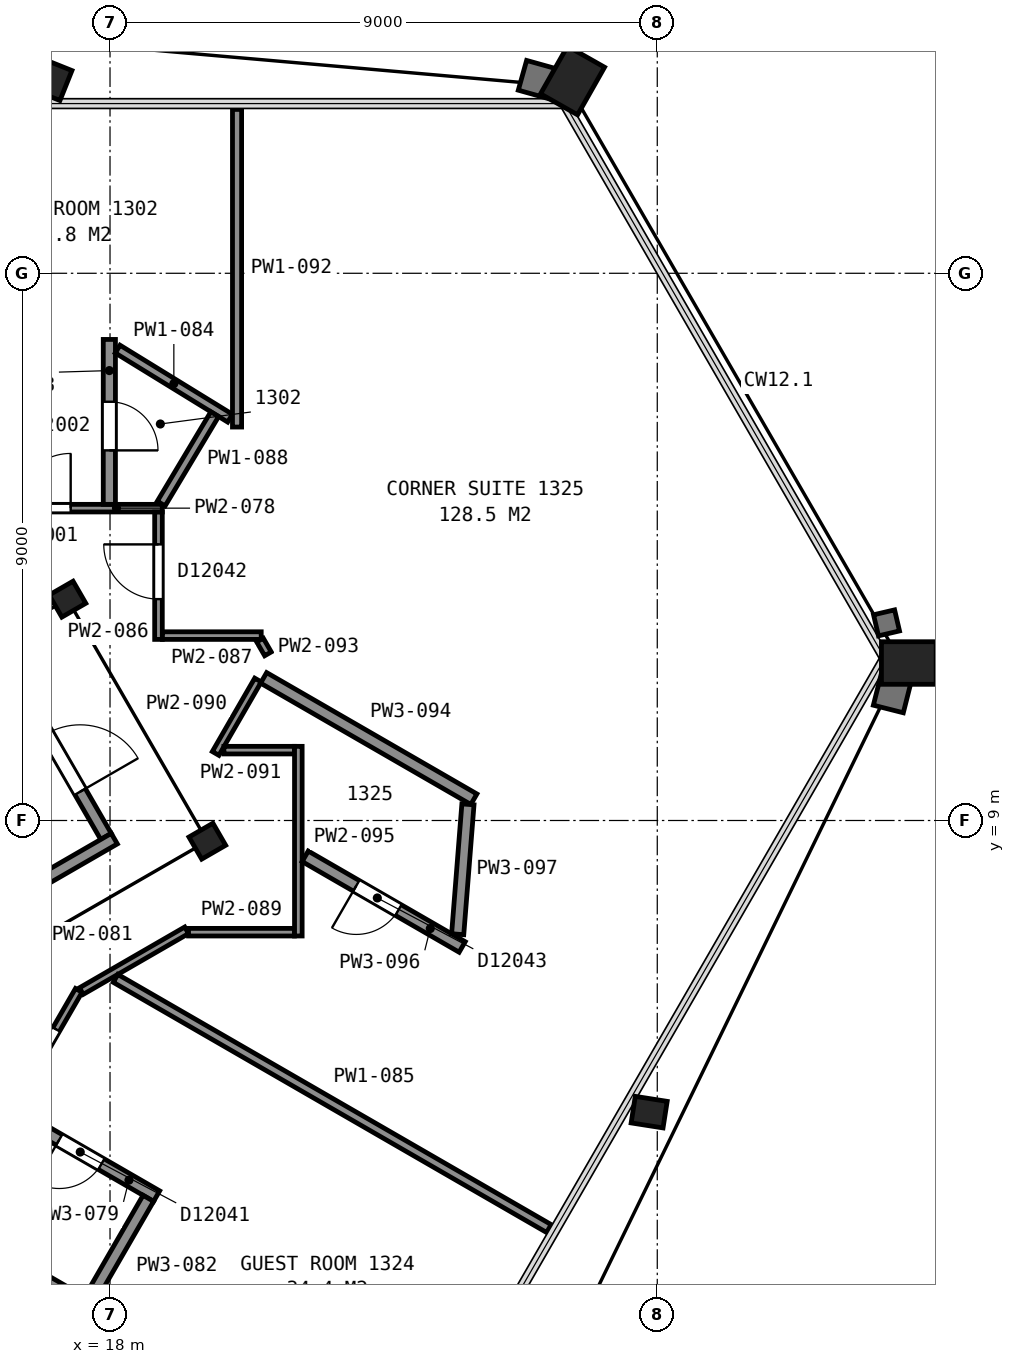
"""IFC4 building model, lengths in metres.
Left out: names, types, materials, properties, quantities, classifications, styles, units other than length and angle.
Written with IfcOpenShell. Run it as: python <this file> out.ifc"""

import sys

from ifc_helpers import new_model, si_unit, direction, frame, frame_2d, origin, origin_2d, place, context, subcontext, project, spatial, rectangle, hollow_rectangle, i_section, extrude, element, fill, save


model = new_model("IFC4")
c1 = context("Model", 3, precision=1e-05, world=origin(), true_north=direction((0.0, 1.0)))
c2 = subcontext(c1, "Body", "Model", "MODEL_VIEW")
j1 = project(units=[si_unit("LENGTHUNIT", "METRE"), si_unit("PLANEANGLEUNIT", "RADIAN")], contexts=[c1])
p1 = place(None, origin())
s1 = spatial("IfcSite", under=j1, at=p1, CompositionType="ELEMENT")
p2 = place(p1, origin())
s2 = spatial("IfcBuilding", under=s1, at=p2, CompositionType="ELEMENT")
p3 = place(p2, frame((0.0, 0.0, 62.0)))
s3 = spatial("IfcBuildingStorey", under=s2, at=p3, CompositionType="ELEMENT", Elevation=62.0)
p4 = place(p3, frame((25.552, 21.073, 0.04), z_axis=(0.046948393509, 0.082988189703, 0.995444025908), x_axis=(0.500028643682, -0.864649637283, 0.048501136518)))
e1 = element("IfcColumn", 1, at=p4, inside=s3, PredefinedType="COLUMN", context=c2, shape_type="SweptSolid", body=[
    extrude(hollow_rectangle(XDim=0.7, YDim=0.9, WallThickness=0.065, at=origin_2d()), origin(), (0.0, 0.0, 1.0), 3.536),
])
p5 = place(p3, frame((17.031, 21.072, 0.025), z_axis=(0.033220358645, 0.083016648819, 0.995994299075), x_axis=(0.999444605974, -0.000142602776, -0.033323554043)))
e2 = element("IfcColumn", 2, at=p5, inside=s3, PredefinedType="COLUMN", context=c2, shape_type="SweptSolid", body=[
    extrude(i_section(OverallWidth=0.442, OverallDepth=0.531, WebThickness=0.066, FlangeThickness=0.106, FilletRadius=0.015, at=origin_2d()), origin(), (0.0, 0.0, 1.0), 3.564),
])
p6 = place(p3, frame((26.762, 4.22, 0.025), z_axis=(0.088563028631, -0.013835832779, 0.99597447743), x_axis=(-0.499716358069, -0.86558252114, 0.032410809553)))
e3 = element("IfcColumn", 3, at=p6, inside=s3, PredefinedType="COLUMN", context=c2, shape_type="SweptSolid", body=[
    extrude(i_section(OverallWidth=0.442, OverallDepth=0.531, WebThickness=0.066, FlangeThickness=0.106, FilletRadius=0.015, at=origin_2d()), origin(), (0.0, 0.0, 1.0), 3.564),
])
p7 = place(p3, frame((31.024, 11.59, 0.04), z_axis=(0.096783070485, 0.0, 0.995305499466), x_axis=(0.49940885804, -0.865004332753, -0.048562298444)))
e4 = element("IfcColumn", 4, at=p7, inside=s3, PredefinedType="COLUMN", context=c2, shape_type="SweptSolid", body=[
    extrude(hollow_rectangle(XDim=0.7, YDim=0.9, WallThickness=0.065, at=origin_2d()), origin(), (0.0, 0.0, 1.0), 3.537),
])
for number, where, z_axis, x_axis in (
    (5, (19.6, 8.66, 0.0), (0.0, 0.0, 1.0), (0.5, -0.866, 0.0)),
    (6, (17.3, 12.64, 0.0), (0.0, 0.0, 1.0), (0.5, -0.866, 0.0)),
):
    element("IfcColumn", number, at=place(p3, frame(where, z_axis=z_axis, x_axis=x_axis)), inside=s3, PredefinedType="COLUMN", context=c2, shape_type="SweptSolid", body=[
        extrude(i_section(OverallWidth=0.419, OverallDepth=0.455, WebThickness=0.042, FlangeThickness=0.068, FilletRadius=0.015, at=origin_2d()), origin(), (0.0, 0.0, 1.0), 3.6),
    ])
p8 = place(p3, frame((17.934, 8.738, 0.0), z_axis=(0.0, 0.0, 1.0), x_axis=(-0.49998411664, 0.866034573852, 0.0)))
e7 = element("IfcWall", 7, at=p8, inside=s3, PredefinedType="PARTITIONING", context=c2, shape_type="SweptSolid", body=[
    extrude(rectangle(XDim=2.8, YDim=0.2, at=frame_2d((1.4, 0.0))), origin(), (0.0, 0.0, 1.0), 3.35),
])
p9 = place(p8, frame((0.85, 0.0, 0.0)))
e8 = element("IfcOpeningElement", 8, at=p9, cuts=e7, PredefinedType="OPENING", context=c2, shape_type="SweptSolid", body=[
    extrude(rectangle(XDim=1.1, YDim=2.1, at=frame_2d((0.55, 1.05))), frame((0.0, 0.11, 0.0), z_axis=(0.0, -1.0, 0.0), x_axis=(1.0, 0.0, 0.0)), (0.0, 0.0, 1.0), 0.22),
])
p10 = place(p3, frame((7.678, 2.701, 0.0), z_axis=(0.0, 0.0, 1.0), x_axis=(0.866026010844, 0.49999894854, 0.0)))
e9 = element("IfcWall", 9, at=p10, inside=s3, PredefinedType="PARTITIONING", context=c2, shape_type="SweptSolid", body=[
    extrude(rectangle(XDim=12.0, YDim=0.2, at=frame_2d((6.0, 0.0))), origin(), (0.0, 0.0, 1.0), 3.35),
])
p11 = place(p3, frame((17.486, 6.206, 0.0), z_axis=(0.0, 0.0, 1.0), x_axis=(-0.499990458811, -0.866030912322, 0.0)))
e10 = element("IfcWall", 10, at=p11, inside=s3, PredefinedType="PARTITIONING", context=c2, shape_type="SweptSolid", body=[
    extrude(rectangle(XDim=27.441, YDim=0.125, at=frame_2d((13.721, 0.0))), origin(), (0.0, 0.0, 1.0), 2.613),
])
p12 = place(p11, frame((20.529, 0.0, 0.0)))
e11 = element("IfcOpeningElement", 11, at=p12, cuts=e10, PredefinedType="OPENING", context=c2, shape_type="SweptSolid", body=[
    extrude(rectangle(XDim=0.9, YDim=2.1, at=frame_2d((0.45, 1.05))), frame((0.0, 0.073, 0.0), z_axis=(0.0, -1.0, 0.0), x_axis=(1.0, 0.0, 0.0)), (0.0, 0.0, 1.0), 0.145),
])
p13 = place(p11, frame((17.516, 0.0, 0.0)))
e12 = element("IfcOpeningElement", 12, at=p13, cuts=e10, PredefinedType="OPENING", context=c2, shape_type="SweptSolid", body=[
    extrude(rectangle(XDim=0.9, YDim=2.1, at=frame_2d((0.45, 1.05))), frame((0.0, 0.073, 0.0), z_axis=(0.0, -1.0, 0.0), x_axis=(1.0, 0.0, 0.0)), (0.0, 0.0, 1.0), 0.145),
])
p14 = place(p11, frame((10.168, 0.0, 0.0)))
e13 = element("IfcOpeningElement", 13, at=p14, cuts=e10, PredefinedType="OPENING", context=c2, shape_type="SweptSolid", body=[
    extrude(rectangle(XDim=0.9, YDim=2.1, at=frame_2d((0.45, 1.05))), frame((0.0, 0.073, 0.0), z_axis=(0.0, -1.0, 0.0), x_axis=(1.0, 0.0, 0.0)), (0.0, 0.0, 1.0), 0.145),
])
p15 = place(p11, frame((7.403, 0.0, 0.0)))
e14 = element("IfcOpeningElement", 14, at=p15, cuts=e10, PredefinedType="OPENING", context=c2, shape_type="SweptSolid", body=[
    extrude(rectangle(XDim=0.9, YDim=2.1, at=frame_2d((0.45, 1.05))), frame((0.0, 0.073, 0.0), z_axis=(0.0, -1.0, 0.0), x_axis=(1.0, 0.0, 0.0)), (0.0, 0.0, 1.0), 0.145),
])
p16 = place(p11, frame((0.741, 0.0, 0.0)))
e15 = element("IfcOpeningElement", 15, at=p16, cuts=e10, PredefinedType="OPENING", context=c2, shape_type="SweptSolid", body=[
    extrude(rectangle(XDim=0.9, YDim=2.1, at=frame_2d((0.45, 1.05))), frame((0.0, 0.073, 0.0), z_axis=(0.0, -1.0, 0.0), x_axis=(1.0, 0.0, 0.0)), (0.0, 0.0, 1.0), 0.145),
])
p17 = place(p3, frame((15.349, 2.37, 0.0), z_axis=(0.0, 0.0, 1.0), x_axis=(0.866033609522, -0.499985786976, 0.0)))
e16 = element("IfcWall", 16, at=p17, inside=s3, PredefinedType="PARTITIONING", context=c2, shape_type="SweptSolid", body=[
    extrude(rectangle(XDim=8.587, YDim=0.15, at=frame_2d((4.293, 0.0))), origin(), (0.0, 0.0, 1.0), 2.613),
])
p18 = place(p3, frame((15.74, 14.137, 0.0), z_axis=(0.0, 0.0, 1.0), x_axis=(1.0, 0.0, 0.0)))
e17 = element("IfcWall", 17, at=p18, inside=s3, PredefinedType="PARTITIONING", context=c2, shape_type="SweptSolid", body=[
    extrude(rectangle(XDim=3.119, YDim=0.125, at=frame_2d((1.56, 0.0))), origin(), (0.0, 0.0, 1.0), 2.613),
])
p19 = place(p18, frame((0.712, 0.0, 0.0)))
e18 = element("IfcOpeningElement", 18, at=p19, cuts=e17, PredefinedType="OPENING", context=c2, shape_type="SweptSolid", body=[
    extrude(rectangle(XDim=0.9, YDim=2.1, at=frame_2d((0.45, 1.05))), frame((0.0, 0.073, 0.0), z_axis=(0.0, -1.0, 0.0), x_axis=(1.0, 0.0, 0.0)), (0.0, 0.0, 1.0), 0.145),
])
p20 = place(p3, frame((18.767, 2.822, 0.0), z_axis=(0.0, 0.0, 1.0), x_axis=(-0.866117296485, 0.499840803386, 0.0)))
e19 = element("IfcWall", 19, at=p20, inside=s3, PredefinedType="PARTITIONING", context=c2, shape_type="SweptSolid", body=[
    extrude(rectangle(XDim=2.738, YDim=0.2, at=frame_2d((1.369, 0.0))), origin(), (0.0, 0.0, 1.0), 2.613),
])
p21 = place(p20, frame((1.051, 0.0, 0.0)))
e20 = element("IfcOpeningElement", 20, at=p21, cuts=e19, PredefinedType="OPENING", context=c2, shape_type="SweptSolid", body=[
    extrude(rectangle(XDim=0.8, YDim=2.1, at=frame_2d((0.4, 1.05))), frame((0.0, 0.11, 0.0), z_axis=(0.0, -1.0, 0.0), x_axis=(1.0, 0.0, 0.0)), (0.0, 0.0, 1.0), 0.22),
])
p22 = place(p3, frame((17.529, 6.195, 0.0), z_axis=(0.0, 0.0, 1.0), x_axis=(0.866002566612, 0.500039553057, 0.0)))
e21 = element("IfcWall", 21, at=p22, inside=s3, PredefinedType="PARTITIONING", context=c2, shape_type="SweptSolid", body=[
    extrude(rectangle(XDim=1.999, YDim=0.125, at=frame_2d((1.0, 0.0))), origin(), (0.0, 0.0, 1.0), 2.613),
])
p23 = place(p3, frame((17.669, 1.123, 0.0), z_axis=(0.0, 0.0, 1.0), x_axis=(0.500269123289, 0.865869969617, 0.0)))
e22 = element("IfcWall", 22, at=p23, inside=s3, PredefinedType="PARTITIONING", context=c2, shape_type="SweptSolid", body=[
    extrude(rectangle(XDim=1.92, YDim=0.2, at=frame_2d((0.96, 0.0))), origin(), (0.0, 0.0, 1.0), 2.613),
])
p24 = place(p3, frame((17.989, 16.912, 0.0), z_axis=(0.0, 0.0, 1.0), x_axis=(0.0, -1.0, 0.0)))
e23 = element("IfcWall", 23, at=p24, inside=s3, PredefinedType="PARTITIONING", context=c2, shape_type="SweptSolid", body=[
    extrude(rectangle(XDim=2.713, YDim=0.2, at=frame_2d((1.356, 0.0))), origin(), (0.0, 0.0, 1.0), 2.613),
])
p25 = place(p24, frame((1.025, 0.0, 0.0)))
e24 = element("IfcOpeningElement", 24, at=p25, cuts=e23, PredefinedType="OPENING", context=c2, shape_type="SweptSolid", body=[
    extrude(rectangle(XDim=0.8, YDim=2.1, at=frame_2d((0.4, 1.05))), frame((0.0, 0.11, 0.0), z_axis=(0.0, -1.0, 0.0), x_axis=(1.0, 0.0, 0.0)), (0.0, 0.0, 1.0), 0.22),
])
p26 = place(p3, frame((18.125, 16.753, 0.0), z_axis=(0.0, 0.0, 1.0), x_axis=(0.851893865078, -0.523714466711, 0.0)))
e25 = element("IfcWall", 25, at=p26, inside=s3, PredefinedType="PARTITIONING", context=c2, shape_type="SweptSolid", body=[
    extrude(rectangle(XDim=2.17, YDim=0.15, at=frame_2d((1.085, 0.0))), origin(), (0.0, 0.0, 1.0), 2.613),
])
p27 = place(p3, frame((18.091, 6.403, 0.0), z_axis=(0.0, 0.0, 1.0), x_axis=(0.866038366034, -0.499977548053, 0.0)))
e26 = element("IfcWall", 26, at=p27, inside=s3, PredefinedType="PARTITIONING", context=c2, shape_type="SweptSolid", body=[
    extrude(rectangle(XDim=8.229, YDim=0.15, at=frame_2d((4.115, 0.0))), origin(), (0.0, 0.0, 1.0), 2.613),
])
p28 = place(p3, frame((18.797, 14.072, 0.0), z_axis=(0.0, 0.0, 1.0), x_axis=(0.0, -1.0, 0.0)))
e27 = element("IfcWall", 27, at=p28, inside=s3, PredefinedType="PARTITIONING", context=c2, shape_type="SweptSolid", body=[
    extrude(rectangle(XDim=2.094, YDim=0.125, at=frame_2d((1.047, 0.0))), origin(), (0.0, 0.0, 1.0), 2.613),
])
p29 = place(p28, frame((0.531, 0.0, 0.0)))
e28 = element("IfcOpeningElement", 28, at=p29, cuts=e27, PredefinedType="OPENING", context=c2, shape_type="SweptSolid", body=[
    extrude(rectangle(XDim=0.9, YDim=2.1, at=frame_2d((0.45, 1.05))), frame((0.0, 0.073, 0.0), z_axis=(0.0, -1.0, 0.0), x_axis=(1.0, 0.0, 0.0)), (0.0, 0.0, 1.0), 0.145),
])
p30 = place(p3, frame((18.862, 12.041, 0.0), z_axis=(0.0, 0.0, 1.0), x_axis=(1.0, 0.0, 0.0)))
e29 = element("IfcWall", 29, at=p30, inside=s3, PredefinedType="PARTITIONING", context=c2, shape_type="SweptSolid", body=[
    extrude(rectangle(XDim=1.625, YDim=0.125, at=frame_2d((0.812, 0.0))), origin(), (0.0, 0.0, 1.0), 2.613),
])
p31 = place(p3, frame((18.842, 14.212, 0.0), z_axis=(0.0, 0.0, 1.0), x_axis=(0.513405982386, 0.858145848472, 0.0)))
e30 = element("IfcWall", 30, at=p31, inside=s3, PredefinedType="PARTITIONING", context=c2, shape_type="SweptSolid", body=[
    extrude(rectangle(XDim=1.714, YDim=0.15, at=frame_2d((0.857, 0.0))), origin(), (0.0, 0.0, 1.0), 2.613),
])
p32 = place(p3, frame((19.291, 7.163, 0.0), z_axis=(0.0, 0.0, 1.0), x_axis=(1.0, 0.0, 0.0)))
e31 = element("IfcWall", 31, at=p32, inside=s3, PredefinedType="PARTITIONING", context=c2, shape_type="SweptSolid", body=[
    extrude(rectangle(XDim=1.741, YDim=0.125, at=frame_2d((0.871, 0.0))), origin(), (0.0, 0.0, 1.0), 2.613),
])
p33 = place(p3, frame((19.737, 10.103, 0.0), z_axis=(0.0, 0.0, 1.0), x_axis=(0.499944854726, 0.866057239582, 0.0)))
e32 = element("IfcWall", 32, at=p33, inside=s3, PredefinedType="PARTITIONING", context=c2, shape_type="SweptSolid", body=[
    extrude(rectangle(XDim=1.394, YDim=0.125, at=frame_2d((0.697, 0.0))), origin(), (0.0, 0.0, 1.0), 2.613),
])
p34 = place(p3, frame((19.873, 10.157, 0.0), z_axis=(0.0, 0.0, 1.0), x_axis=(1.0, 0.0, 0.0)))
e33 = element("IfcWall", 33, at=p34, inside=s3, PredefinedType="PARTITIONING", context=c2, shape_type="SweptSolid", body=[
    extrude(rectangle(XDim=1.159, YDim=0.125, at=frame_2d((0.58, 0.0))), origin(), (0.0, 0.0, 1.0), 2.613),
])
p35 = place(p3, frame((20.089, 15.471, 0.0), z_axis=(0.0, 0.0, 1.0), x_axis=(0.0, 1.0, 0.0)))
e34 = element("IfcWall", 34, at=p35, inside=s3, PredefinedType="PARTITIONING", context=c2, shape_type="SweptSolid", body=[
    extrude(rectangle(XDim=5.224, YDim=0.15, at=frame_2d((2.612, 0.0))), origin(), (0.0, 0.0, 1.0), 2.613),
])
p36 = place(p3, frame((20.467, 11.967, 0.0), z_axis=(0.0, 0.0, 1.0), x_axis=(0.500153222552, -0.865936922628, 0.0)))
e35 = element("IfcWall", 35, at=p36, inside=s3, PredefinedType="PARTITIONING", context=c2, shape_type="SweptSolid", body=[
    extrude(rectangle(XDim=0.262, YDim=0.125, at=frame_2d((0.131, 0.0))), origin(), (0.0, 0.0, 1.0), 2.613),
])
p37 = place(p3, frame((20.526, 11.346, 0.0), z_axis=(0.0, 0.0, 1.0), x_axis=(0.866089865591, -0.499888332251, 0.0)))
e36 = element("IfcWall", 36, at=p37, inside=s3, PredefinedType="PARTITIONING", context=c2, shape_type="SweptSolid", body=[
    extrude(rectangle(XDim=3.992, YDim=0.2, at=frame_2d((1.996, 0.0))), origin(), (0.0, 0.0, 1.0), 2.613),
])
p38 = place(p3, frame((21.097, 7.101, 0.0), z_axis=(0.0, 0.0, 1.0), x_axis=(0.0, 1.0, 0.0)))
e37 = element("IfcWall", 37, at=p38, inside=s3, PredefinedType="PARTITIONING", context=c2, shape_type="SweptSolid", body=[
    extrude(rectangle(XDim=3.119, YDim=0.125, at=frame_2d((1.56, 0.0))), origin(), (0.0, 0.0, 1.0), 2.613),
])
p39 = place(p3, frame((21.209, 8.411, 0.0), z_axis=(0.0, 0.0, 1.0), x_axis=(0.86595648724, -0.500119347963, 0.0)))
e38 = element("IfcWall", 38, at=p39, inside=s3, PredefinedType="PARTITIONING", context=c2, shape_type="SweptSolid", body=[
    extrude(rectangle(XDim=2.982, YDim=0.2, at=frame_2d((1.491, 0.0))), origin(), (0.0, 0.0, 1.0), 2.613),
])
p40 = place(p39, frame((0.97, 0.0, 0.0)))
e39 = element("IfcOpeningElement", 39, at=p40, cuts=e38, PredefinedType="OPENING", context=c2, shape_type="SweptSolid", body=[
    extrude(rectangle(XDim=0.8, YDim=2.1, at=frame_2d((0.4, 1.05))), frame((0.0, 0.11, 0.0), z_axis=(0.0, -1.0, 0.0), x_axis=(1.0, 0.0, 0.0)), (0.0, 0.0, 1.0), 0.22),
])
p41 = place(p3, frame((23.718, 7.129, 0.0), z_axis=(0.0, 0.0, 1.0), x_axis=(0.078848500899, 0.996886610355, 0.0)))
e40 = element("IfcWall", 40, at=p41, inside=s3, PredefinedType="PARTITIONING", context=c2, shape_type="SweptSolid", body=[
    extrude(rectangle(XDim=2.143, YDim=0.2, at=frame_2d((1.071, 0.0))), origin(), (0.0, 0.0, 1.0), 2.613),
])
p42 = place(p9, origin())
e41 = element("IfcDoor", 41, at=p42, inside=s3, OperationType="SINGLE_SWING_LEFT", PredefinedType="DOOR", context=c2, shape_type="SweptSolid", body=[
    extrude(rectangle(XDim=1.1, YDim=2.1, at=frame_2d((0.55, 1.05))), frame((0.0, 0.025, 0.0), z_axis=(0.0, -1.0, 0.0), x_axis=(1.0, 0.0, 0.0)), (0.0, 0.0, 1.0), 0.05),
])
fill(e8, e41)
p43 = place(p16, origin())
e42 = element("IfcDoor", 42, at=p43, inside=s3, OperationType="SINGLE_SWING_LEFT", PredefinedType="DOOR", context=c2, shape_type="SweptSolid", body=[
    extrude(rectangle(XDim=0.9, YDim=2.1, at=frame_2d((0.45, 1.05))), frame((0.0, 0.025, 0.0), z_axis=(0.0, -1.0, 0.0), x_axis=(1.0, 0.0, 0.0)), (0.0, 0.0, 1.0), 0.05),
])
fill(e15, e42)
p44 = place(p19, origin())
e43 = element("IfcDoor", 43, at=p44, inside=s3, OperationType="SINGLE_SWING_RIGHT", PredefinedType="DOOR", context=c2, shape_type="SweptSolid", body=[
    extrude(rectangle(XDim=0.9, YDim=2.1, at=frame_2d((0.45, 1.05))), frame((0.0, 0.025, 0.0), z_axis=(0.0, -1.0, 0.0), x_axis=(1.0, 0.0, 0.0)), (0.0, 0.0, 1.0), 0.05),
])
fill(e18, e43)
p45 = place(p21, origin())
e44 = element("IfcDoor", 44, at=p45, inside=s3, OperationType="SINGLE_SWING_RIGHT", PredefinedType="DOOR", context=c2, shape_type="SweptSolid", body=[
    extrude(rectangle(XDim=0.8, YDim=2.1, at=frame_2d((0.4, 1.05))), frame((0.0, 0.025, 0.0), z_axis=(0.0, -1.0, 0.0), x_axis=(1.0, 0.0, 0.0)), (0.0, 0.0, 1.0), 0.05),
])
fill(e20, e44)
p46 = place(p25, origin())
e45 = element("IfcDoor", 45, at=p46, inside=s3, OperationType="SINGLE_SWING_RIGHT", PredefinedType="DOOR", context=c2, shape_type="SweptSolid", body=[
    extrude(rectangle(XDim=0.8, YDim=2.1, at=frame_2d((0.4, 1.05))), frame((0.0, 0.025, 0.0), z_axis=(0.0, -1.0, 0.0), x_axis=(1.0, 0.0, 0.0)), (0.0, 0.0, 1.0), 0.05),
])
fill(e24, e45)
p47 = place(p29, origin())
e46 = element("IfcDoor", 46, at=p47, inside=s3, OperationType="SINGLE_SWING_LEFT", PredefinedType="DOOR", context=c2, shape_type="SweptSolid", body=[
    extrude(rectangle(XDim=0.9, YDim=2.1, at=frame_2d((0.45, 1.05))), frame((0.0, 0.025, 0.0), z_axis=(0.0, -1.0, 0.0), x_axis=(1.0, 0.0, 0.0)), (0.0, 0.0, 1.0), 0.05),
])
fill(e28, e46)
p48 = place(p40, origin())
e47 = element("IfcDoor", 47, at=p48, inside=s3, OperationType="SINGLE_SWING_LEFT", PredefinedType="DOOR", context=c2, shape_type="SweptSolid", body=[
    extrude(rectangle(XDim=0.8, YDim=2.1, at=frame_2d((0.4, 1.05))), frame((0.0, 0.025, 0.0), z_axis=(0.0, -1.0, 0.0), x_axis=(1.0, 0.0, 0.0)), (0.0, 0.0, 1.0), 0.05),
])
fill(e39, e47)
save(model, sys.argv[1])
